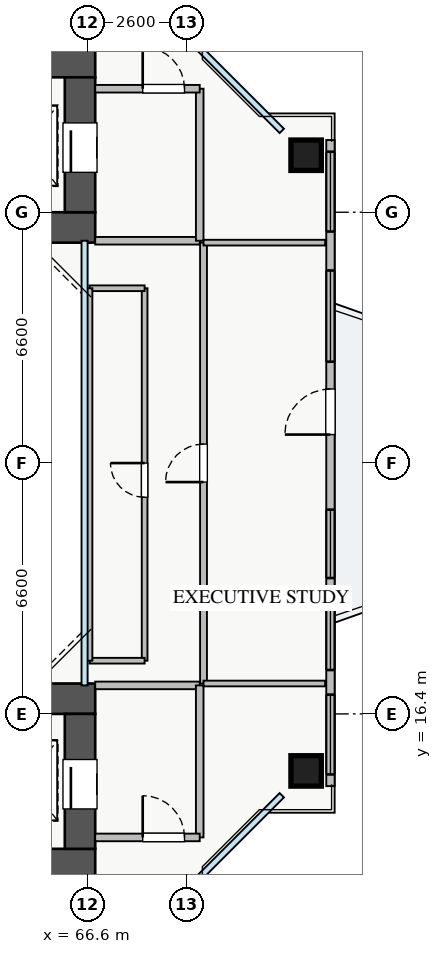
"""IFC4 building model, lengths in metres.
Left out: names, types, materials, properties, quantities, classifications, styles, units other than length and angle.
Written with IfcOpenShell. Run it as: python <this file> out.ifc"""

import sys

from ifc_helpers import new_model, si_unit, direction, frame, frame_2d, origin, origin_2d, place, context, subcontext, project, spatial, rectangle, extrude, source, transform, mapped, element, fill, save


model = new_model("IFC4")
c1 = context("Model", 3, precision=1e-05, world=origin(), true_north=direction((0.0, 1.0)))
c2 = subcontext(c1, "Body", "Model", "MODEL_VIEW")
j1 = project(units=[si_unit("LENGTHUNIT", "METRE"), si_unit("PLANEANGLEUNIT", "RADIAN")], contexts=[c1])
p1 = place(None, origin())
s1 = spatial("IfcSite", under=j1, at=p1, CompositionType="ELEMENT")
p2 = place(p1, origin())
s2 = spatial("IfcBuilding", under=s1, at=p2, CompositionType="ELEMENT")
p3 = place(p2, frame((0.0, 0.0, 97.0)))
s3 = spatial("IfcBuildingStorey", under=s2, at=p3, CompositionType="ELEMENT", Elevation=97.0)
p4 = place(p3, frame((54.2, 29.2, 0.0), z_axis=(0.0, 0.0, 1.0), x_axis=(1.0, 0.0, 0.0)))
e1 = element("IfcWall", 1, at=p4, inside=s3, PredefinedType="SHEAR", context=c2, shape_type="SweptSolid", body=[
    extrude(rectangle(XDim=12.6, YDim=0.8, at=frame_2d((6.3, 0.0))), origin(), (0.0, 0.0, 1.0), 3.25),
])
p5 = place(p3, frame((54.2, 33.55, 0.0), z_axis=(0.0, 0.0, 1.0), x_axis=(1.0, 0.0, 0.0)))
e2 = element("IfcWall", 2, at=p5, inside=s3, PredefinedType="SHEAR", context=c2, shape_type="SweptSolid", body=[
    extrude(rectangle(XDim=12.6, YDim=0.8, at=frame_2d((6.3, 0.0))), origin(), (0.0, 0.0, 1.0), 3.25),
])
p6 = place(p5, frame((8.2, 0.0, 0.0)))
e3 = element("IfcOpeningElement", 3, at=p6, cuts=e2, PredefinedType="OPENING", context=c2, shape_type="SweptSolid", body=[
    extrude(rectangle(XDim=1.1, YDim=2.05, at=frame_2d((0.55, 1.025))), frame((0.0, 0.41, 0.0), z_axis=(0.0, -1.0, 0.0), x_axis=(1.0, 0.0, 0.0)), (0.0, 0.0, 1.0), 0.82),
])
p7 = place(p3, frame((66.4, 29.6, 0.0), z_axis=(0.0, 0.0, 1.0), x_axis=(0.0, 1.0, 0.0)))
e4 = element("IfcWall", 4, at=p7, inside=s3, PredefinedType="SHEAR", context=c2, shape_type="SweptSolid", body=[
    extrude(rectangle(XDim=3.55, YDim=0.8, at=frame_2d((1.775, 0.0))), origin(), (0.0, 0.0, 1.0), 3.25),
])
p8 = place(p7, frame((1.05, 0.0, 0.0)))
e5 = element("IfcOpeningElement", 5, at=p8, cuts=e4, PredefinedType="OPENING", context=c2, shape_type="SweptSolid", body=[
    extrude(rectangle(XDim=1.3, YDim=2.05, at=frame_2d((0.65, 1.025))), frame((0.0, 0.41, 0.0), z_axis=(0.0, -1.0, 0.0), x_axis=(1.0, 0.0, 0.0)), (0.0, 0.0, 1.0), 0.82),
])
p9 = place(p3, frame((54.2, 12.45, 0.0), z_axis=(0.0, 0.0, 1.0), x_axis=(1.0, 0.0, 0.0)))
e6 = element("IfcWall", 6, at=p9, inside=s3, PredefinedType="SHEAR", context=c2, shape_type="SweptSolid", body=[
    extrude(rectangle(XDim=12.6, YDim=0.8, at=frame_2d((6.3, 0.0))), origin(), (0.0, 0.0, 1.0), 3.25),
])
p10 = place(p9, frame((8.2, 0.0, 0.0)))
e7 = element("IfcOpeningElement", 7, at=p10, cuts=e6, PredefinedType="OPENING", context=c2, shape_type="SweptSolid", body=[
    extrude(rectangle(XDim=1.1, YDim=2.05, at=frame_2d((0.55, 1.025))), frame((0.0, 0.41, 0.0), z_axis=(0.0, -1.0, 0.0), x_axis=(1.0, 0.0, 0.0)), (0.0, 0.0, 1.0), 0.82),
])
p11 = place(p3, frame((54.2, 16.8, 0.0), z_axis=(0.0, 0.0, 1.0), x_axis=(1.0, 0.0, 0.0)))
e8 = element("IfcWall", 8, at=p11, inside=s3, PredefinedType="SHEAR", context=c2, shape_type="SweptSolid", body=[
    extrude(rectangle(XDim=12.6, YDim=0.8, at=frame_2d((6.3, 0.0))), origin(), (0.0, 0.0, 1.0), 3.25),
])
p12 = place(p3, frame((66.4, 12.85, 0.0), z_axis=(0.0, 0.0, 1.0), x_axis=(0.0, 1.0, 0.0)))
e9 = element("IfcWall", 9, at=p12, inside=s3, PredefinedType="SHEAR", context=c2, shape_type="SweptSolid", body=[
    extrude(rectangle(XDim=3.55, YDim=0.8, at=frame_2d((1.775, 0.0))), origin(), (0.0, 0.0, 1.0), 3.25),
])
p13 = place(p12, frame((1.05, 0.0, 0.0)))
e10 = element("IfcOpeningElement", 10, at=p13, cuts=e9, PredefinedType="OPENING", context=c2, shape_type="SweptSolid", body=[
    extrude(rectangle(XDim=1.3, YDim=2.05, at=frame_2d((0.65, 1.025))), frame((0.0, 0.41, 0.0), z_axis=(0.0, -1.0, 0.0), x_axis=(1.0, 0.0, 0.0)), (0.0, 0.0, 1.0), 0.82),
])
m1 = source(origin(), c2, "Body", "SweptSolid", [
    extrude(rectangle(XDim=0.8, YDim=0.8, at=origin_2d()), origin(), (0.0, 0.0, 1.0), 3.25),
])
for number, where, z_axis, x_axis in (
    (11, (72.35, 14.9, 0.0), (0.0, 0.0, 1.0), (1.0, 0.0, 0.0)),
    (12, (72.35, 31.1, 0.0), (0.0, 0.0, 1.0), (1.0, 0.0, 0.0)),
):
    element("IfcColumn", number, at=place(p3, frame(where, z_axis=z_axis, x_axis=x_axis)), inside=s3, PredefinedType="COLUMN", context=c2, shape_type="MappedRepresentation", body=[
        mapped(m1, transform((0.0, 0.0, 0.0), x_axis=(1.0, 0.0, 0.0), y_axis=(0.0, 1.0, 0.0), z_axis=(0.0, 0.0, 1.0), scale=1.0)),
    ])
p14 = place(p3, frame((72.99, 14.5, 0.0), z_axis=(0.0, 0.0, 1.0), x_axis=(0.0, 1.0, 0.0)))
e13 = element("IfcWall", 13, at=p14, inside=s3, PredefinedType="STANDARD", context=c2, shape_type="SweptSolid", body=[
    extrude(rectangle(XDim=17.0, YDim=0.22, at=frame_2d((8.5, 0.0))), origin(), (0.0, 0.0, 1.0), 2.61),
])
p15 = place(p14, frame((9.25, 0.0, 0.0)))
e14 = element("IfcOpeningElement", 14, at=p15, cuts=e13, PredefinedType="OPENING", context=c2, shape_type="SweptSolid", body=[
    extrude(rectangle(XDim=1.2, YDim=2.1, at=frame_2d((0.6, 1.05))), frame((0.0, 0.12, 0.0), z_axis=(0.0, -1.0, 0.0), x_axis=(1.0, 0.0, 0.0)), (0.0, 0.0, 1.0), 0.24),
])
p16 = place(p14, frame((0.308, 0.0, 0.9)))
e15 = element("IfcOpeningElement", 15, at=p16, cuts=e13, PredefinedType="OPENING", context=c2, shape_type="SweptSolid", body=[
    extrude(rectangle(XDim=2.1, YDim=1.5, at=frame_2d((1.05, 0.75))), frame((0.0, 0.12, 0.0), z_axis=(0.0, -1.0, 0.0), x_axis=(1.0, 0.0, 0.0)), (0.0, 0.0, 1.0), 0.24),
])
p17 = place(p14, frame((5.475, 0.0, 0.9)))
e16 = element("IfcOpeningElement", 16, at=p17, cuts=e13, PredefinedType="OPENING", context=c2, shape_type="SweptSolid", body=[
    extrude(rectangle(XDim=1.8, YDim=1.45, at=frame_2d((0.9, 0.725))), frame((0.0, 0.12, 0.0), z_axis=(0.0, -1.0, 0.0), x_axis=(1.0, 0.0, 0.0)), (0.0, 0.0, 1.0), 0.24),
])
p18 = place(p14, frame((14.593, 0.0, 0.9)))
e17 = element("IfcOpeningElement", 17, at=p18, cuts=e13, PredefinedType="OPENING", context=c2, shape_type="SweptSolid", body=[
    extrude(rectangle(XDim=2.1, YDim=1.5, at=frame_2d((1.05, 0.75))), frame((0.0, 0.12, 0.0), z_axis=(0.0, -1.0, 0.0), x_axis=(1.0, 0.0, 0.0)), (0.0, 0.0, 1.0), 0.24),
])
p19 = place(p14, frame((3.055, 0.0, 0.9)))
e18 = element("IfcOpeningElement", 18, at=p19, cuts=e13, PredefinedType="OPENING", context=c2, shape_type="SweptSolid", body=[
    extrude(rectangle(XDim=2.1, YDim=1.5, at=frame_2d((1.05, 0.75))), frame((0.0, 0.12, 0.0), z_axis=(0.0, -1.0, 0.0), x_axis=(1.0, 0.0, 0.0)), (0.0, 0.0, 1.0), 0.24),
])
p20 = place(p14, frame((11.167, 0.0, 0.9)))
e19 = element("IfcOpeningElement", 19, at=p20, cuts=e13, PredefinedType="OPENING", context=c2, shape_type="SweptSolid", body=[
    extrude(rectangle(XDim=2.4, YDim=1.5, at=frame_2d((1.2, 0.75))), frame((0.0, 0.12, 0.0), z_axis=(0.0, -1.0, 0.0), x_axis=(1.0, 0.0, 0.0)), (0.0, 0.0, 1.0), 0.24),
])
p21 = place(p3, frame((66.8, 28.85, 0.0), z_axis=(0.0, 0.0, 1.0), x_axis=(1.0, 0.0, 0.0)))
e20 = element("IfcWall", 20, at=p21, inside=s3, PredefinedType="PARTITIONING", context=c2, shape_type="SweptSolid", body=[
    extrude(rectangle(XDim=2.75, YDim=0.2, at=frame_2d((1.375, 0.0))), origin(), (0.0, 0.0, 1.0), 3.07),
])
p22 = place(p3, frame((69.55, 28.85, 0.0), z_axis=(0.0, 0.0, 1.0), x_axis=(0.0, 1.0, 0.0)))
e21 = element("IfcWall", 21, at=p22, inside=s3, PredefinedType="PARTITIONING", context=c2, shape_type="SweptSolid", body=[
    extrude(rectangle(XDim=4.0, YDim=0.2, at=frame_2d((2.0, 0.0))), origin(), (0.0, 0.0, 1.0), 3.07),
])
p23 = place(p3, frame((66.8, 32.85, 0.0), z_axis=(0.0, 0.0, 1.0), x_axis=(1.0, 0.0, 0.0)))
e22 = element("IfcWall", 22, at=p23, inside=s3, PredefinedType="PARTITIONING", context=c2, shape_type="SweptSolid", body=[
    extrude(rectangle(XDim=2.75, YDim=0.2, at=frame_2d((1.375, 0.0))), origin(), (0.0, 0.0, 1.0), 3.07),
])
p24 = place(p23, frame((1.25, 0.0, 0.0)))
e23 = element("IfcOpeningElement", 23, at=p24, cuts=e22, PredefinedType="OPENING", context=c2, shape_type="SweptSolid", body=[
    extrude(rectangle(XDim=1.1, YDim=2.05, at=frame_2d((0.55, 1.025))), frame((0.0, 0.11, 0.0), z_axis=(0.0, -1.0, 0.0), x_axis=(1.0, 0.0, 0.0)), (0.0, 0.0, 1.0), 0.22),
])
p25 = place(p3, frame((66.8, 17.15, 0.0), z_axis=(0.0, 0.0, 1.0), x_axis=(1.0, 0.0, 0.0)))
e24 = element("IfcWall", 24, at=p25, inside=s3, PredefinedType="PARTITIONING", context=c2, shape_type="SweptSolid", body=[
    extrude(rectangle(XDim=2.75, YDim=0.2, at=frame_2d((1.375, 0.0))), origin(), (0.0, 0.0, 1.0), 3.07),
])
p26 = place(p3, frame((69.55, 13.15, 0.0), z_axis=(0.0, 0.0, 1.0), x_axis=(0.0, 1.0, 0.0)))
e25 = element("IfcWall", 25, at=p26, inside=s3, PredefinedType="PARTITIONING", context=c2, shape_type="SweptSolid", body=[
    extrude(rectangle(XDim=4.0, YDim=0.2, at=frame_2d((2.0, 0.0))), origin(), (0.0, 0.0, 1.0), 3.07),
])
p27 = place(p3, frame((66.8, 13.15, 0.0), z_axis=(0.0, 0.0, 1.0), x_axis=(1.0, 0.0, 0.0)))
e26 = element("IfcWall", 26, at=p27, inside=s3, PredefinedType="PARTITIONING", context=c2, shape_type="SweptSolid", body=[
    extrude(rectangle(XDim=2.75, YDim=0.2, at=frame_2d((1.375, 0.0))), origin(), (0.0, 0.0, 1.0), 3.07),
])
p28 = place(p27, frame((1.25, 0.0, 0.0)))
e27 = element("IfcOpeningElement", 27, at=p28, cuts=e26, PredefinedType="OPENING", context=c2, shape_type="SweptSolid", body=[
    extrude(rectangle(XDim=1.1, YDim=2.05, at=frame_2d((0.55, 1.025))), frame((0.0, 0.11, 0.0), z_axis=(0.0, -1.0, 0.0), x_axis=(1.0, 0.0, 0.0)), (0.0, 0.0, 1.0), 0.22),
])
p29 = place(p3, frame((69.65, 17.2, 0.0), z_axis=(0.0, 0.0, 1.0), x_axis=(0.0, 1.0, 0.0)))
e28 = element("IfcWall", 28, at=p29, inside=s3, PredefinedType="PARTITIONING", context=c2, shape_type="SweptSolid", body=[
    extrude(rectangle(XDim=11.6, YDim=0.18, at=frame_2d((5.8, 0.0))), origin(), (0.0, 0.0, 1.0), 3.07),
])
p30 = place(p29, frame((5.3, 0.0, 0.0)))
e29 = element("IfcOpeningElement", 29, at=p30, cuts=e28, PredefinedType="OPENING", context=c2, shape_type="SweptSolid", body=[
    extrude(rectangle(XDim=1.0, YDim=2.05, at=frame_2d((0.5, 1.025))), frame((0.0, 0.1, 0.0), z_axis=(0.0, -1.0, 0.0), x_axis=(1.0, 0.0, 0.0)), (0.0, 0.0, 1.0), 0.2),
])
for number, where, z_axis, x_axis in (
    (30, (69.65, 17.2, 0.0), (0.0, 0.0, 1.0), (1.0, 0.0, 0.0)),
    (31, (69.65, 28.8, 0.0), (0.0, 0.0, 1.0), (1.0, 0.0, 0.0)),
):
    element("IfcWall", number, at=place(p3, frame(where, z_axis=z_axis, x_axis=x_axis)), inside=s3, PredefinedType="PARTITIONING", context=c2, shape_type="SweptSolid", body=[
        extrude(rectangle(XDim=3.2, YDim=0.15, at=frame_2d((1.6, 0.0))), origin(), (0.0, 0.0, 1.0), 3.07),
    ])
p31 = place(p3, frame((68.1, 17.8, 0.0), z_axis=(0.0, 0.0, 1.0), x_axis=(0.0, 1.0, 0.0)))
e32 = element("IfcWall", 32, at=p31, inside=s3, PredefinedType="PARTITIONING", context=c2, shape_type="SweptSolid", body=[
    extrude(rectangle(XDim=9.8, YDim=0.15, at=frame_2d((4.9, 0.0))), origin(), (0.0, 0.0, 1.0), 3.07),
])
p32 = place(p31, frame((4.3, 0.0, 0.0)))
e33 = element("IfcOpeningElement", 33, at=p32, cuts=e32, PredefinedType="OPENING", context=c2, shape_type="SweptSolid", body=[
    extrude(rectangle(XDim=0.9, YDim=2.05, at=frame_2d((0.45, 1.025))), frame((0.0, 0.085, 0.0), z_axis=(0.0, -1.0, 0.0), x_axis=(1.0, 0.0, 0.0)), (0.0, 0.0, 1.0), 0.17),
])
p33 = place(p3, frame((66.65, 27.6, 0.0), z_axis=(0.0, 0.0, 1.0), x_axis=(1.0, 0.0, 0.0)))
e34 = element("IfcWall", 34, at=p33, inside=s3, PredefinedType="PARTITIONING", context=c2, shape_type="SweptSolid", body=[
    extrude(rectangle(XDim=1.45, YDim=0.15, at=frame_2d((0.725, 0.0))), origin(), (0.0, 0.0, 1.0), 2.715),
])
p34 = place(p3, frame((66.65, 17.8, 0.0), z_axis=(0.0, 0.0, 1.0), x_axis=(1.0, 0.0, 0.0)))
e35 = element("IfcWall", 35, at=p34, inside=s3, PredefinedType="PARTITIONING", context=c2, shape_type="SweptSolid", body=[
    extrude(rectangle(XDim=1.45, YDim=0.15, at=frame_2d((0.725, 0.0))), origin(), (0.0, 0.0, 1.0), 3.07),
])
p35 = place(p3, frame((66.65, 17.8, 0.0), z_axis=(0.0, 0.0, 1.0), x_axis=(0.0, 1.0, 0.0)))
e36 = element("IfcWall", 36, at=p35, inside=s3, PredefinedType="PARTITIONING", context=c2, shape_type="SweptSolid", body=[
    extrude(rectangle(XDim=9.8, YDim=0.15, at=frame_2d((4.9, 0.0))), origin(), (0.0, 0.0, 1.0), 2.665),
])
m2 = source(origin(), c2, "Body", "SweptSolid", [
    extrude(rectangle(XDim=1.2, YDim=2.1, at=frame_2d((0.6, 1.05))), frame((0.0, 0.025, 0.0), z_axis=(0.0, -1.0, 0.0), x_axis=(1.0, 0.0, 0.0)), (0.0, 0.0, 1.0), 0.05),
])
p36 = place(p15, origin())
e37 = element("IfcDoor", 37, at=p36, inside=s3, OperationType="SINGLE_SWING_LEFT", PredefinedType="DOOR", context=c2, shape_type="MappedRepresentation", body=[
    mapped(m2, transform((0.0, 0.0, 0.0), x_axis=(1.0, 0.0, 0.0), y_axis=(0.0, 1.0, 0.0), z_axis=(0.0, 0.0, 1.0), scale=1.0)),
])
fill(e14, e37)
m3 = source(origin(), c2, "Body", "SweptSolid", [
    extrude(rectangle(XDim=2.1, YDim=1.5, at=frame_2d((1.05, 0.75))), frame((0.0, 0.03, 0.0), z_axis=(0.0, -1.0, 0.0), x_axis=(1.0, 0.0, 0.0)), (0.0, 0.0, 1.0), 0.06),
])
p37 = place(p16, origin())
e38 = element("IfcWindow", 38, at=p37, inside=s3, PartitioningType="TRIPLE_PANEL_VERTICAL", PredefinedType="WINDOW", context=c2, shape_type="MappedRepresentation", body=[
    mapped(m3, transform((0.0, 0.0, 0.0), x_axis=(1.0, 0.0, 0.0), y_axis=(0.0, 1.0, 0.0), z_axis=(0.0, 0.0, 1.0), scale=1.0)),
])
fill(e15, e38)
m4 = source(origin(), c2, "Body", "SweptSolid", [
    extrude(rectangle(XDim=1.8, YDim=1.45, at=frame_2d((0.9, 0.725))), frame((0.0, 0.03, 0.0), z_axis=(0.0, -1.0, 0.0), x_axis=(1.0, 0.0, 0.0)), (0.0, 0.0, 1.0), 0.06),
])
p38 = place(p17, origin())
e39 = element("IfcWindow", 39, at=p38, inside=s3, PartitioningType="DOUBLE_PANEL_VERTICAL", PredefinedType="WINDOW", context=c2, shape_type="MappedRepresentation", body=[
    mapped(m4, transform((0.0, 0.0, 0.0), x_axis=(1.0, 0.0, 0.0), y_axis=(0.0, 1.0, 0.0), z_axis=(0.0, 0.0, 1.0), scale=1.0)),
])
fill(e16, e39)
p39 = place(p18, origin())
e40 = element("IfcWindow", 40, at=p39, inside=s3, PartitioningType="TRIPLE_PANEL_VERTICAL", PredefinedType="WINDOW", context=c2, shape_type="MappedRepresentation", body=[
    mapped(m3, transform((0.0, 0.0, 0.0), x_axis=(1.0, 0.0, 0.0), y_axis=(0.0, 1.0, 0.0), z_axis=(0.0, 0.0, 1.0), scale=1.0)),
])
fill(e17, e40)
m5 = source(origin(), c2, "Body", "SweptSolid", [
    extrude(rectangle(XDim=1.3, YDim=2.05, at=frame_2d((0.65, 1.025))), frame((0.0, 0.025, 0.0), z_axis=(0.0, -1.0, 0.0), x_axis=(1.0, 0.0, 0.0)), (0.0, 0.0, 1.0), 0.05),
])
p40 = place(p8, origin())
e41 = element("IfcDoor", 41, at=p40, inside=s3, OperationType="SLIDING_TO_LEFT", PredefinedType="DOOR", context=c2, shape_type="MappedRepresentation", body=[
    mapped(m5, transform((0.0, 0.0, 0.0), x_axis=(1.0, 0.0, 0.0), y_axis=(0.0, 1.0, 0.0), z_axis=(0.0, 0.0, 1.0), scale=1.0)),
])
fill(e5, e41)
p41 = place(p13, origin())
e42 = element("IfcDoor", 42, at=p41, inside=s3, OperationType="SLIDING_TO_RIGHT", PredefinedType="DOOR", context=c2, shape_type="MappedRepresentation", body=[
    mapped(m5, transform((0.0, 0.0, 0.0), x_axis=(1.0, 0.0, 0.0), y_axis=(0.0, 1.0, 0.0), z_axis=(0.0, 0.0, 1.0), scale=1.0)),
])
fill(e10, e42)
m6 = source(origin(), c2, "Body", "SweptSolid", [
    extrude(rectangle(XDim=1.1, YDim=2.05, at=frame_2d((0.55, 1.025))), frame((0.0, 0.025, 0.0), z_axis=(0.0, -1.0, 0.0), x_axis=(1.0, 0.0, 0.0)), (0.0, 0.0, 1.0), 0.05),
])
p42 = place(p24, origin())
e43 = element("IfcDoor", 43, at=p42, inside=s3, OperationType="SINGLE_SWING_LEFT", PredefinedType="DOOR", context=c2, shape_type="MappedRepresentation", body=[
    mapped(m6, transform((0.0, 0.0, 0.0), x_axis=(1.0, 0.0, 0.0), y_axis=(0.0, 1.0, 0.0), z_axis=(0.0, 0.0, 1.0), scale=1.0)),
])
fill(e23, e43)
p43 = place(p28, origin())
e44 = element("IfcDoor", 44, at=p43, inside=s3, OperationType="SINGLE_SWING_LEFT", PredefinedType="DOOR", context=c2, shape_type="MappedRepresentation", body=[
    mapped(m6, transform((0.0, 0.0, 0.0), x_axis=(1.0, 0.0, 0.0), y_axis=(0.0, 1.0, 0.0), z_axis=(0.0, 0.0, 1.0), scale=1.0)),
])
fill(e27, e44)
m7 = source(origin(), c2, "Body", "SweptSolid", [
    extrude(rectangle(XDim=1.0, YDim=2.05, at=frame_2d((0.5, 1.025))), frame((0.0, 0.025, 0.0), z_axis=(0.0, -1.0, 0.0), x_axis=(1.0, 0.0, 0.0)), (0.0, 0.0, 1.0), 0.05),
])
p44 = place(p30, origin())
e45 = element("IfcDoor", 45, at=p44, inside=s3, OperationType="SINGLE_SWING_LEFT", PredefinedType="DOOR", context=c2, shape_type="MappedRepresentation", body=[
    mapped(m7, transform((0.0, 0.0, 0.0), x_axis=(1.0, 0.0, 0.0), y_axis=(0.0, 1.0, 0.0), z_axis=(0.0, 0.0, 1.0), scale=1.0)),
])
fill(e29, e45)
m8 = source(origin(), c2, "Body", "SweptSolid", [
    extrude(rectangle(XDim=0.9, YDim=2.05, at=frame_2d((0.45, 1.025))), frame((0.0, 0.025, 0.0), z_axis=(0.0, -1.0, 0.0), x_axis=(1.0, 0.0, 0.0)), (0.0, 0.0, 1.0), 0.05),
])
p45 = place(p32, origin())
e46 = element("IfcDoor", 46, at=p45, inside=s3, OperationType="SINGLE_SWING_RIGHT", PredefinedType="DOOR", context=c2, shape_type="MappedRepresentation", body=[
    mapped(m8, transform((0.0, 0.0, 0.0), x_axis=(1.0, 0.0, 0.0), y_axis=(0.0, 1.0, 0.0), z_axis=(0.0, 0.0, 1.0), scale=1.0)),
])
fill(e33, e46)
p46 = place(p19, origin())
e47 = element("IfcWindow", 47, at=p46, inside=s3, PartitioningType="TRIPLE_PANEL_VERTICAL", PredefinedType="WINDOW", context=c2, shape_type="MappedRepresentation", body=[
    mapped(m3, transform((0.0, 0.0, 0.0), x_axis=(1.0, 0.0, 0.0), y_axis=(0.0, 1.0, 0.0), z_axis=(0.0, 0.0, 1.0), scale=1.0)),
])
fill(e18, e47)
m9 = source(origin(), c2, "Body", "SweptSolid", [
    extrude(rectangle(XDim=2.4, YDim=1.5, at=frame_2d((1.2, 0.75))), frame((0.0, 0.03, 0.0), z_axis=(0.0, -1.0, 0.0), x_axis=(1.0, 0.0, 0.0)), (0.0, 0.0, 1.0), 0.06),
])
p47 = place(p20, origin())
e48 = element("IfcWindow", 48, at=p47, inside=s3, PartitioningType="TRIPLE_PANEL_VERTICAL", PredefinedType="WINDOW", context=c2, shape_type="MappedRepresentation", body=[
    mapped(m9, transform((0.0, 0.0, 0.0), x_axis=(1.0, 0.0, 0.0), y_axis=(0.0, 1.0, 0.0), z_axis=(0.0, 0.0, 1.0), scale=1.0)),
])
fill(e19, e48)
save(model, sys.argv[1])
